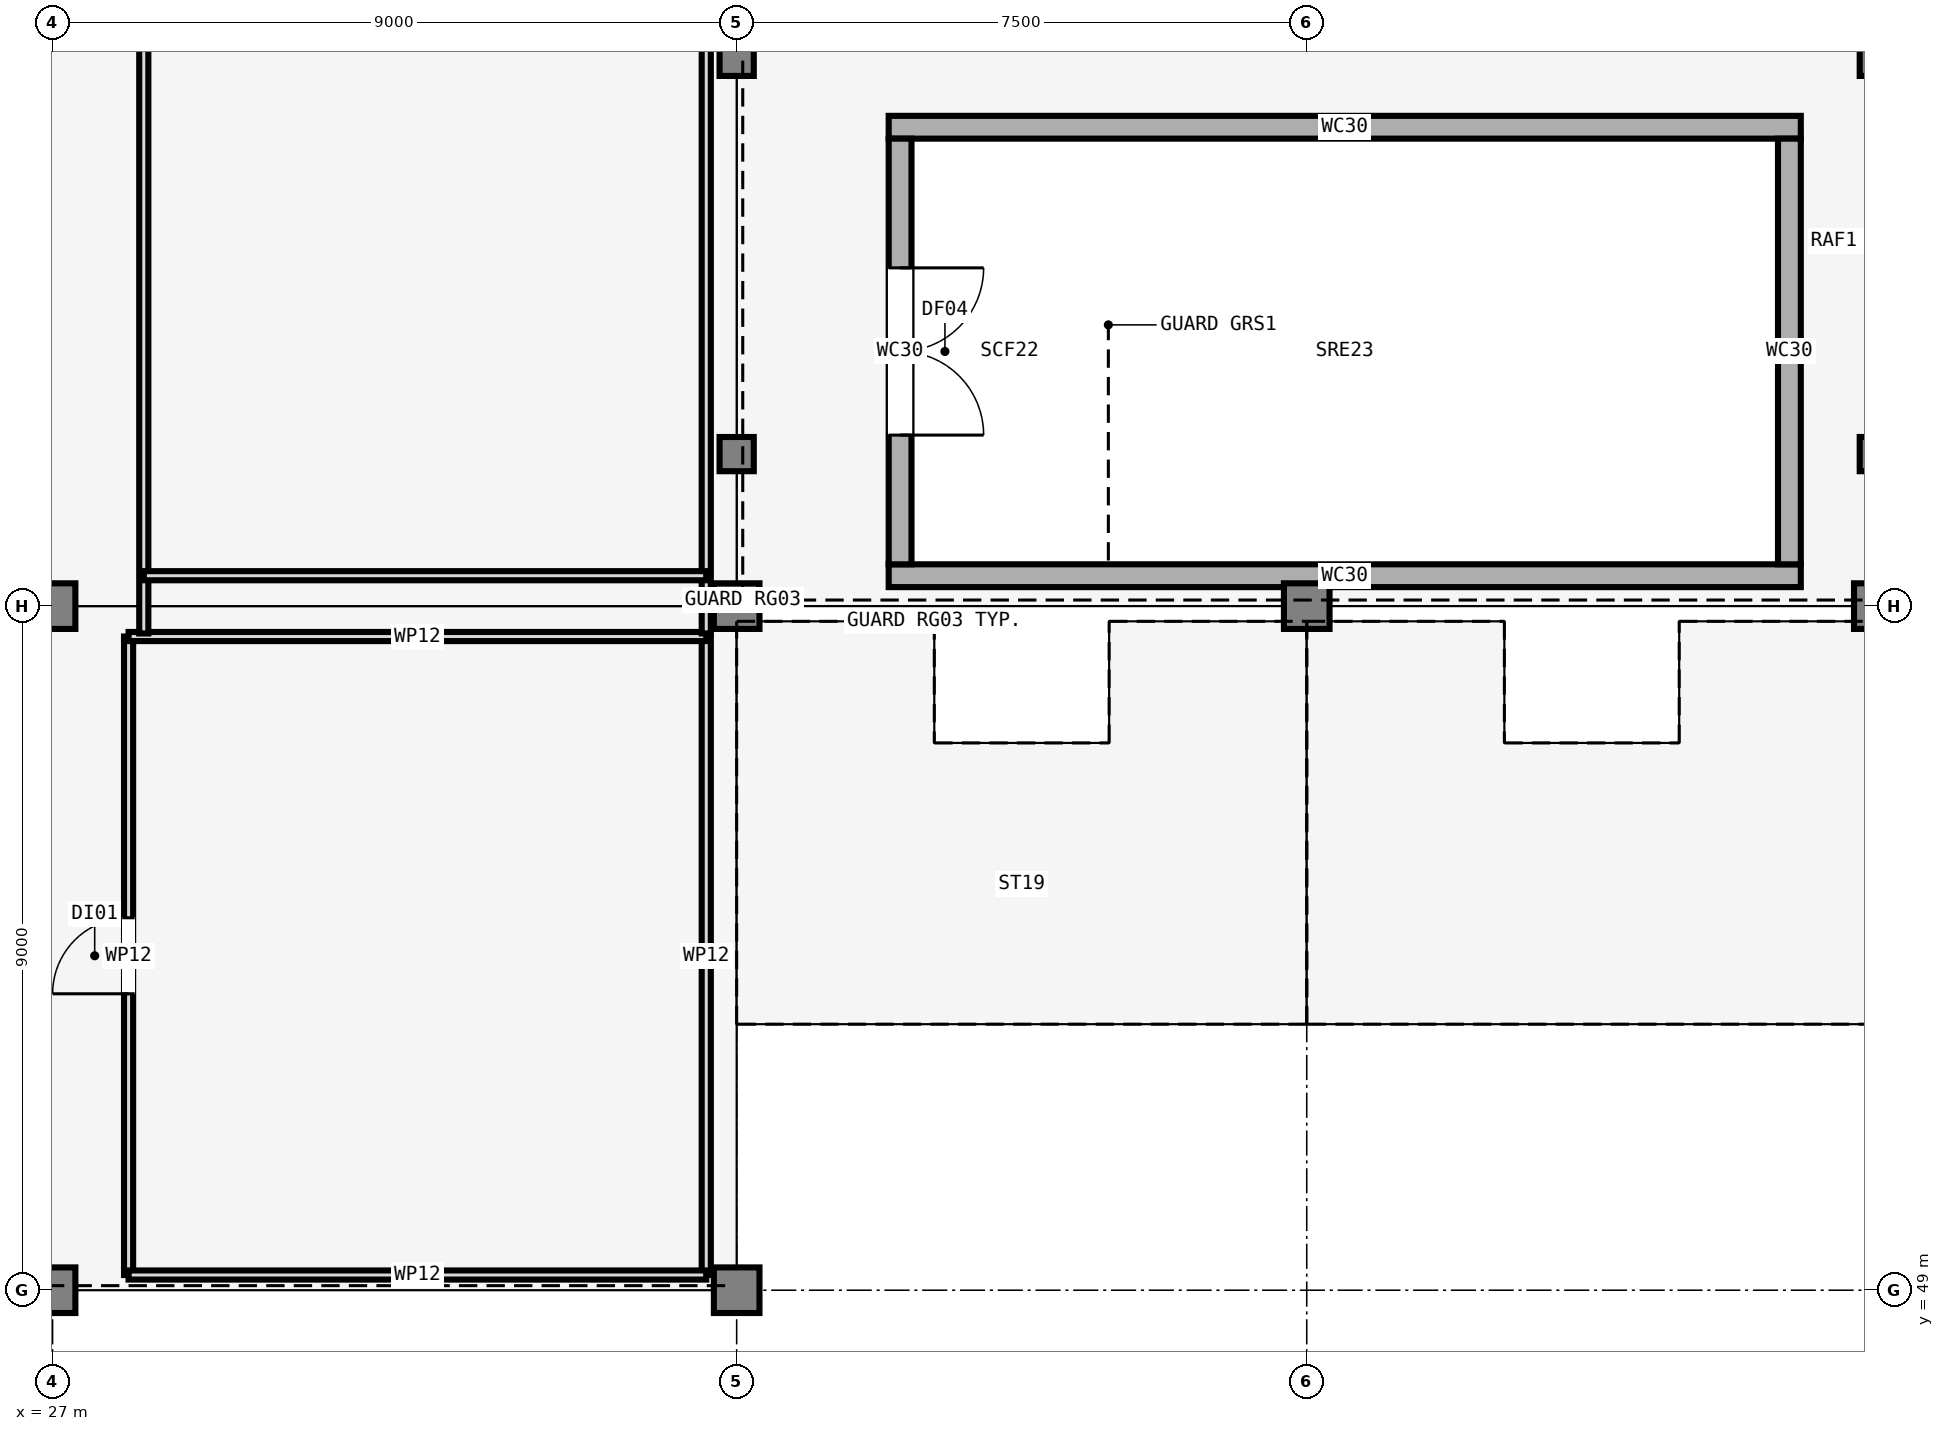
"""IFC4 building model, lengths in metres.
Left out: names, types, materials, properties, quantities, classifications, styles, units other than length and angle.
Written with IfcOpenShell. Run it as: python <this file> out.ifc"""

import sys

from ifc_helpers import new_model, si_unit, direction, frame, frame_2d, origin, origin_2d, place, context, subcontext, project, spatial, rectangle, extrude, element, fill, save


model = new_model("IFC4")
c1 = context("Model", 3, precision=1e-05, world=origin(), true_north=direction((0.0, 1.0)))
c2 = subcontext(c1, "Body", "Model", "MODEL_VIEW")
j1 = project(units=[si_unit("LENGTHUNIT", "METRE"), si_unit("PLANEANGLEUNIT", "RADIAN")], contexts=[c1])
p1 = place(None, origin())
s1 = spatial("IfcSite", under=j1, at=p1, CompositionType="ELEMENT")
p2 = place(p1, origin())
s2 = spatial("IfcBuilding", under=s1, at=p2, CompositionType="ELEMENT")
p3 = place(p2, frame((0.0, 0.0, 4.8)))
s3 = spatial("IfcBuildingStorey", under=s2, at=p3, CompositionType="ELEMENT", Elevation=4.8)
for number, where, z_axis, x_axis in (
    (1, (27.0, 49.0, 0.0), (0.0, 0.0, 1.0), (1.0, 0.0, 0.0)),
    (2, (27.0, 58.0, 0.0), (0.0, 0.0, 1.0), (1.0, 0.0, 0.0)),
    (3, (36.0, 49.0, 0.0), (0.0, 0.0, 1.0), (1.0, 0.0, 0.0)),
    (4, (36.0, 58.0, 0.0), (0.0, 0.0, 1.0), (1.0, 0.0, 0.0)),
    (5, (43.5, 58.0, 0.0), (0.0, 0.0, 1.0), (1.0, 0.0, 0.0)),
    (6, (51.0, 58.0, 0.0), (0.0, 0.0, 1.0), (1.0, 0.0, 0.0)),
):
    element("IfcColumn", number, at=place(p3, frame(where, z_axis=z_axis, x_axis=x_axis)), inside=s3, PredefinedType="COLUMN", context=c2, shape_type="SweptSolid", body=[
        extrude(rectangle(XDim=0.6, YDim=0.6, at=origin_2d()), origin(), (0.0, 0.0, 1.0), 4.5),
    ])
for number, where, z_axis, x_axis in (
    (7, (36.0, 60.0, 0.0), (0.0, 0.0, 1.0), (1.0, 0.0, 0.0)),
    (8, (36.0, 65.2, 0.0), (0.0, 0.0, 1.0), (1.0, 0.0, 0.0)),
    (9, (51.0, 60.0, 0.0), (0.0, 0.0, 1.0), (1.0, 0.0, 0.0)),
    (10, (51.0, 65.2, 0.0), (0.0, 0.0, 1.0), (1.0, 0.0, 0.0)),
):
    element("IfcColumn", number, at=place(p3, frame(where, z_axis=z_axis, x_axis=x_axis)), inside=s3, PredefinedType="COLUMN", context=c2, shape_type="SweptSolid", body=[
        extrude(rectangle(XDim=0.45, YDim=0.45, at=origin_2d()), origin(), (0.0, 0.0, 1.0), 2.805),
    ])
for number, where, z_axis, x_axis in (
    (11, (38.0, 58.4, 0.0), (0.0, 0.0, 1.0), (1.0, 0.0, 0.0)),
    (12, (50.0, 64.3, 0.0), (0.0, 0.0, 1.0), (-1.0, 0.0, 0.0)),
):
    element("IfcWall", number, at=place(p3, frame(where, z_axis=z_axis, x_axis=x_axis)), inside=s3, PredefinedType="SHEAR", context=c2, shape_type="SweptSolid", body=[
        extrude(rectangle(XDim=12.0, YDim=0.3, at=frame_2d((6.0, 0.0))), origin(), (0.0, 0.0, 1.0), 3.4),
    ])
p4 = place(p3, frame((38.15, 64.15, 0.0), z_axis=(0.0, 0.0, 1.0), x_axis=(0.0, -1.0, 0.0)))
e13 = element("IfcWall", 13, at=p4, inside=s3, PredefinedType="SHEAR", context=c2, shape_type="SweptSolid", body=[
    extrude(rectangle(XDim=5.6, YDim=0.3, at=frame_2d((2.8, 0.0))), origin(), (0.0, 0.0, 1.0), 3.4),
])
p5 = place(p4, frame((1.7, 0.0, 0.0)))
e14 = element("IfcOpeningElement", 14, at=p5, cuts=e13, PredefinedType="OPENING", context=c2, shape_type="SweptSolid", body=[
    extrude(rectangle(XDim=2.2, YDim=2.25, at=frame_2d((1.1, 1.125))), frame((0.0, 0.16, 0.0), z_axis=(0.0, -1.0, 0.0), x_axis=(1.0, 0.0, 0.0)), (0.0, 0.0, 1.0), 0.32),
])
p6 = place(p3, frame((49.85, 58.55, 0.0), z_axis=(0.0, 0.0, 1.0), x_axis=(0.0, 1.0, 0.0)))
e15 = element("IfcWall", 15, at=p6, inside=s3, PredefinedType="SHEAR", context=c2, shape_type="SweptSolid", body=[
    extrude(rectangle(XDim=5.6, YDim=0.3, at=frame_2d((2.8, 0.0))), origin(), (0.0, 0.0, 1.0), 3.4),
])
p7 = place(p3, frame((35.6, 57.6, 0.0), z_axis=(0.0, 0.0, 1.0), x_axis=(0.0, -1.0, 0.0)))
e16 = element("IfcWall", 16, at=p7, inside=s3, PredefinedType="PARTITIONING", context=c2, shape_type="SweptSolid", body=[
    extrude(rectangle(XDim=8.4, YDim=0.12, at=frame_2d((4.2, 0.0))), origin(), (0.0, 0.0, 1.0), 3.4),
])
p8 = place(p3, frame((28.0, 49.2, 0.0), z_axis=(0.0, 0.0, 1.0), x_axis=(0.0, 1.0, 0.0)))
e17 = element("IfcWall", 17, at=p8, inside=s3, PredefinedType="PARTITIONING", context=c2, shape_type="SweptSolid", body=[
    extrude(rectangle(XDim=8.4, YDim=0.12, at=frame_2d((4.2, 0.0))), origin(), (0.0, 0.0, 1.0), 3.4),
])
p9 = place(p8, frame((3.7, 0.0, 0.0)))
e18 = element("IfcOpeningElement", 18, at=p9, cuts=e17, PredefinedType="OPENING", context=c2, shape_type="SweptSolid", body=[
    extrude(rectangle(XDim=1.0, YDim=2.1, at=frame_2d((0.5, 1.05))), frame((0.0, 0.07, 0.0), z_axis=(0.0, -1.0, 0.0), x_axis=(1.0, 0.0, 0.0)), (0.0, 0.0, 1.0), 0.14),
])
for number, where, z_axis, x_axis in (
    (19, (35.6, 49.2, 0.0), (0.0, 0.0, 1.0), (-1.0, 0.0, 0.0)),
    (20, (28.0, 57.6, 0.0), (0.0, 0.0, 1.0), (1.0, 0.0, 0.0)),
):
    element("IfcWall", number, at=place(p3, frame(where, z_axis=z_axis, x_axis=x_axis)), inside=s3, PredefinedType="PARTITIONING", context=c2, shape_type="SweptSolid", body=[
        extrude(rectangle(XDim=7.6, YDim=0.12, at=frame_2d((3.8, 0.0))), origin(), (0.0, 0.0, 1.0), 3.4),
    ])
p10 = place(p3, frame((28.2, 57.64, 0.0), z_axis=(0.0, 0.0, 1.0), x_axis=(0.0, 1.0, 0.0)))
e21 = element("IfcWall", 21, at=p10, inside=s3, PredefinedType="PARTITIONING", context=c2, shape_type="SweptSolid", body=[
    extrude(rectangle(XDim=34.7, YDim=0.12, at=frame_2d((17.35, 0.0))), origin(), (0.0, 0.0, 1.0), 3.4),
])
p11 = place(p10, frame((15.75, 0.0, 0.0)))
e22 = element("IfcOpeningElement", 22, at=p11, cuts=e21, PredefinedType="OPENING", context=c2, shape_type="SweptSolid", body=[
    extrude(rectangle(XDim=1.0, YDim=2.1, at=frame_2d((0.5, 1.05))), frame((0.0, 0.07, 0.0), z_axis=(0.0, -1.0, 0.0), x_axis=(1.0, 0.0, 0.0)), (0.0, 0.0, 1.0), 0.14),
])
p12 = place(p3, frame((35.6, 66.325, 0.0), z_axis=(0.0, 0.0, 1.0), x_axis=(0.0, -1.0, 0.0)))
e23 = element("IfcWall", 23, at=p12, inside=s3, PredefinedType="PARTITIONING", context=c2, shape_type="SweptSolid", body=[
    extrude(rectangle(XDim=8.685, YDim=0.12, at=frame_2d((4.343, 0.0))), origin(), (0.0, 0.0, 1.0), 3.4),
])
p13 = place(p3, frame((35.6, 58.4, 0.0), z_axis=(0.0, 0.0, 1.0), x_axis=(-1.0, 0.0, 0.0)))
e24 = element("IfcWall", 24, at=p13, inside=s3, PredefinedType="PARTITIONING", context=c2, shape_type="SweptSolid", body=[
    extrude(rectangle(XDim=7.4, YDim=0.12, at=frame_2d((3.7, 0.0))), origin(), (0.0, 0.0, 1.0), 3.4),
])
p14 = place(p5, origin())
e25 = element("IfcDoor", 25, at=p14, inside=s3, OperationType="DOUBLE_DOOR_SINGLE_SWING", PredefinedType="DOOR", context=c2, shape_type="SweptSolid", body=[
    extrude(rectangle(XDim=2.2, YDim=2.25, at=frame_2d((1.1, 1.125))), frame((0.0, 0.025, 0.0), z_axis=(0.0, -1.0, 0.0), x_axis=(1.0, 0.0, 0.0)), (0.0, 0.0, 1.0), 0.05),
])
fill(e14, e25)
p15 = place(p9, origin())
e26 = element("IfcDoor", 26, at=p15, inside=s3, OperationType="SINGLE_SWING_LEFT", PredefinedType="DOOR", context=c2, shape_type="SweptSolid", body=[
    extrude(rectangle(XDim=1.0, YDim=2.1, at=frame_2d((0.5, 1.05))), frame((0.0, 0.025, 0.0), z_axis=(0.0, -1.0, 0.0), x_axis=(1.0, 0.0, 0.0)), (0.0, 0.0, 1.0), 0.05),
])
fill(e18, e26)
save(model, sys.argv[1])
